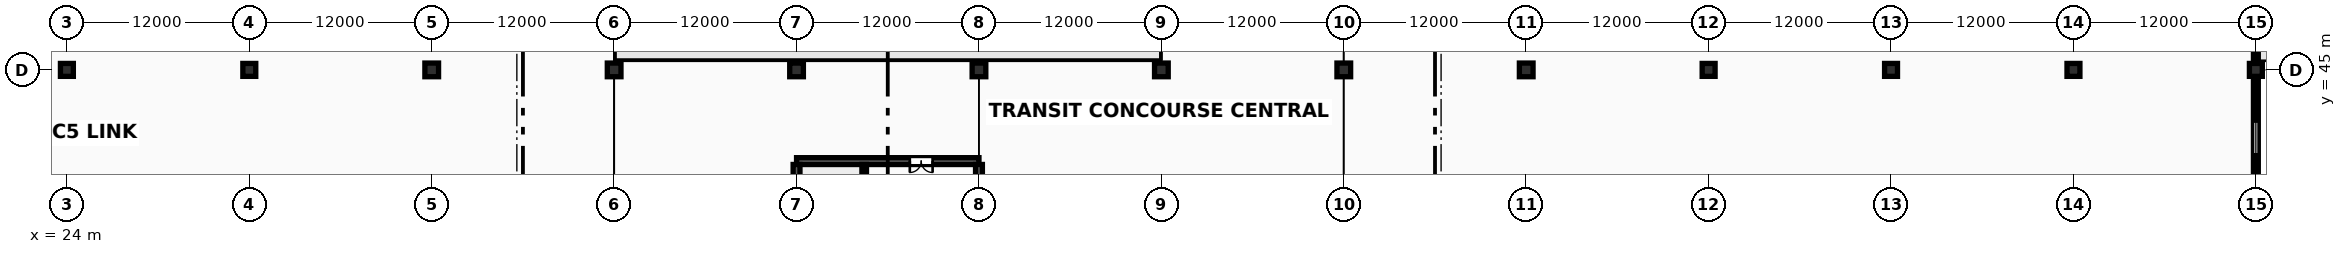
"""IFC4 building model, lengths in metres.
Left out: names, types, materials, properties, quantities, classifications, styles, units other than length and angle.
Written with IfcOpenShell. Run it as: python <this file> out.ifc"""

import sys

from ifc_helpers import new_model, si_unit, direction, frame, frame_2d, origin, origin_2d, place, context, subcontext, project, spatial, rectangle, extrude, element, fill, save


model = new_model("IFC4")
c1 = context("Model", 3, precision=1e-05, world=origin(), true_north=direction((0.0, 1.0)))
c2 = subcontext(c1, "Body", "Model", "MODEL_VIEW")
j1 = project(units=[si_unit("LENGTHUNIT", "METRE"), si_unit("PLANEANGLEUNIT", "RADIAN")], contexts=[c1])
p1 = place(None, origin())
s1 = spatial("IfcSite", under=j1, at=p1, CompositionType="ELEMENT")
p2 = place(p1, origin())
s2 = spatial("IfcBuilding", under=s1, at=p2, CompositionType="ELEMENT")
p3 = place(p2, origin())
s3 = spatial("IfcBuildingStorey", under=s2, at=p3, CompositionType="ELEMENT", Elevation=0.0)
for number, where, z_axis, x_axis in (
    (1, (24.0, 45.0, 0.0), (0.0, 0.0, 1.0), (1.0, 0.0, 0.0)),
    (2, (36.0, 45.0, 0.0), (0.0, 0.0, 1.0), (1.0, 0.0, 0.0)),
):
    element("IfcColumn", number, at=place(p3, frame(where, z_axis=z_axis, x_axis=x_axis)), inside=s3, PredefinedType="COLUMN", context=c2, shape_type="SweptSolid", body=[
        extrude(rectangle(XDim=0.85, YDim=0.85, at=origin_2d()), origin(), (0.0, 0.0, 1.0), 5.4),
    ])
for number, where, z_axis, x_axis in (
    (3, (48.0, 45.0, 0.0), (0.0, 0.0, 1.0), (1.0, 0.0, 0.0)),
    (4, (60.0, 45.0, 0.0), (0.0, 0.0, 1.0), (1.0, 0.0, 0.0)),
    (5, (72.0, 45.0, 0.0), (0.0, 0.0, 1.0), (1.0, 0.0, 0.0)),
    (6, (84.0, 45.0, 0.0), (0.0, 0.0, 1.0), (1.0, 0.0, 0.0)),
    (7, (96.0, 45.0, 0.0), (0.0, 0.0, 1.0), (1.0, 0.0, 0.0)),
    (8, (108.0, 45.0, 0.0), (0.0, 0.0, 1.0), (1.0, 0.0, 0.0)),
    (9, (120.0, 45.0, 0.0), (0.0, 0.0, 1.0), (1.0, 0.0, 0.0)),
):
    element("IfcColumn", number, at=place(p3, frame(where, z_axis=z_axis, x_axis=x_axis)), inside=s3, PredefinedType="COLUMN", context=c2, shape_type="SweptSolid", body=[
        extrude(rectangle(XDim=0.9, YDim=0.9, at=origin_2d()), origin(), (0.0, 0.0, 1.0), 5.4),
    ])
for number, where, z_axis, x_axis in (
    (10, (132.0, 45.0, 0.0), (0.0, 0.0, 1.0), (1.0, 0.0, 0.0)),
    (11, (144.0, 45.0, 0.0), (0.0, 0.0, 1.0), (1.0, 0.0, 0.0)),
    (12, (156.0, 45.0, 0.0), (0.0, 0.0, 1.0), (1.0, 0.0, 0.0)),
    (13, (168.0, 45.0, 0.0), (0.0, 0.0, 1.0), (1.0, 0.0, 0.0)),
):
    element("IfcColumn", number, at=place(p3, frame(where, z_axis=z_axis, x_axis=x_axis)), inside=s3, PredefinedType="COLUMN", context=c2, shape_type="SweptSolid", body=[
        extrude(rectangle(XDim=0.85, YDim=0.85, at=origin_2d()), origin(), (0.0, 0.0, 1.0), 5.4),
    ])
p4 = place(p3, frame((72.0, 39.0, 0.0), z_axis=(0.0, 0.0, 1.0), x_axis=(1.0, 0.0, 0.0)))
e14 = element("IfcWall", 14, at=p4, inside=s3, PredefinedType="SHEAR", context=c2, shape_type="SweptSolid", body=[
    extrude(rectangle(XDim=12.0, YDim=0.45, at=frame_2d((6.0, 0.0))), origin(), (0.0, 0.0, 1.0), 5.203),
])
p5 = place(p4, frame((7.45, 0.0, 0.0)))
e15 = element("IfcOpeningElement", 15, at=p5, cuts=e14, PredefinedType="OPENING", context=c2, shape_type="SweptSolid", body=[
    extrude(rectangle(XDim=1.5, YDim=2.25, at=frame_2d((0.75, 1.125))), frame((0.0, 0.24, 0.0), z_axis=(0.0, -1.0, 0.0), x_axis=(1.0, 0.0, 0.0)), (0.0, 0.0, 1.0), 0.48),
])
for number, where, z_axis, x_axis in (
    (16, (72.0, 27.422, 0.0), (0.0, 0.0, 1.0), (0.0, 1.0, 0.0)),
    (17, (84.0, 27.422, 0.0), (0.0, 0.0, 1.0), (0.0, 1.0, 0.0)),
):
    element("IfcWall", number, at=place(p3, frame(where, z_axis=z_axis, x_axis=x_axis)), inside=s3, PredefinedType="SHEAR", context=c2, shape_type="SweptSolid", body=[
        extrude(rectangle(XDim=11.356, YDim=0.45, at=frame_2d((5.678, 0.0))), origin(), (0.0, 0.0, 1.0), 5.203),
    ])
p6 = place(p3, frame((76.45, 27.222, 0.0), z_axis=(0.0, 0.0, 1.0), x_axis=(0.0, 1.0, 0.0)))
e18 = element("IfcWall", 18, at=p6, inside=s3, PredefinedType="SHEAR", context=c2, shape_type="SweptSolid", body=[
    extrude(rectangle(XDim=11.556, YDim=0.3, at=frame_2d((5.778, 0.0))), origin(), (0.0, 0.0, 1.0), 5.203),
])
p7 = place(p6, frame((0.9, 0.0, 0.0)))
e19 = element("IfcOpeningElement", 19, at=p7, cuts=e18, PredefinedType="OPENING", context=c2, shape_type="SweptSolid", body=[
    extrude(rectangle(XDim=1.1, YDim=2.2, at=frame_2d((0.55, 1.1))), frame((0.0, 0.165, 0.0), z_axis=(0.0, -1.0, 0.0), x_axis=(1.0, 0.0, 0.0)), (0.0, 0.0, 1.0), 0.33),
])
p8 = place(p3, frame((168.0, 36.473, 0.0), z_axis=(0.0, 0.0, 1.0), x_axis=(0.0, 1.0, 0.0)))
e20 = element("IfcWall", 20, at=p8, inside=s3, PredefinedType="SOLIDWALL", context=c2, shape_type="SweptSolid", body=[
    extrude(rectangle(XDim=8.104, YDim=0.32, at=frame_2d((4.052, 0.0))), origin(), (0.0, 0.0, 1.0), 3.85),
])
p9 = place(p8, frame((2.972, 0.0, 0.55)))
e21 = element("IfcOpeningElement", 21, at=p9, cuts=e20, PredefinedType="OPENING", context=c2, shape_type="SweptSolid", body=[
    extrude(rectangle(XDim=2.16, YDim=1.42, at=frame_2d((1.08, 0.71))), frame((0.0, 0.175, 0.0), z_axis=(0.0, -1.0, 0.0), x_axis=(1.0, 0.0, 0.0)), (0.0, 0.0, 1.0), 0.35),
])
p10 = place(p3, frame((168.0, 45.423, 0.0), z_axis=(0.0, 0.0, 1.0), x_axis=(0.0, 1.0, 0.0)))
e22 = element("IfcWall", 22, at=p10, inside=s3, PredefinedType="SOLIDWALL", context=c2, shape_type="SweptSolid", body=[
    extrude(rectangle(XDim=11.154, YDim=0.32, at=frame_2d((5.577, 0.0))), origin(), (0.0, 0.0, 1.0), 3.85),
])
p11 = place(p10, frame((2.577, 0.0, 0.0)))
e23 = element("IfcOpeningElement", 23, at=p11, cuts=e22, PredefinedType="OPENING", context=c2, shape_type="SweptSolid", body=[
    extrude(rectangle(XDim=6.0, YDim=3.2, at=frame_2d((3.0, 1.6))), frame((0.0, 0.175, 0.0), z_axis=(0.0, -1.0, 0.0), x_axis=(1.0, 0.0, 0.0)), (0.0, 0.0, 1.0), 0.35),
])
p12 = place(p9, origin())
e24 = element("IfcWindow", 24, at=p12, inside=s3, PartitioningType="DOUBLE_PANEL_VERTICAL", PredefinedType="WINDOW", context=c2, shape_type="SweptSolid", body=[
    extrude(rectangle(XDim=2.16, YDim=1.42, at=frame_2d((1.08, 0.71))), frame((0.0, 0.03, 0.0), z_axis=(0.0, -1.0, 0.0), x_axis=(1.0, 0.0, 0.0)), (0.0, 0.0, 1.0), 0.06),
])
fill(e21, e24)
p13 = place(p5, origin())
e25 = element("IfcDoor", 25, at=p13, inside=s3, OperationType="DOUBLE_DOOR_SINGLE_SWING", PredefinedType="DOOR", context=c2, shape_type="SweptSolid", body=[
    extrude(rectangle(XDim=1.5, YDim=2.25, at=frame_2d((0.75, 1.125))), frame((0.0, 0.025, 0.0), z_axis=(0.0, -1.0, 0.0), x_axis=(1.0, 0.0, 0.0)), (0.0, 0.0, 1.0), 0.05),
])
fill(e15, e25)
save(model, sys.argv[1])
